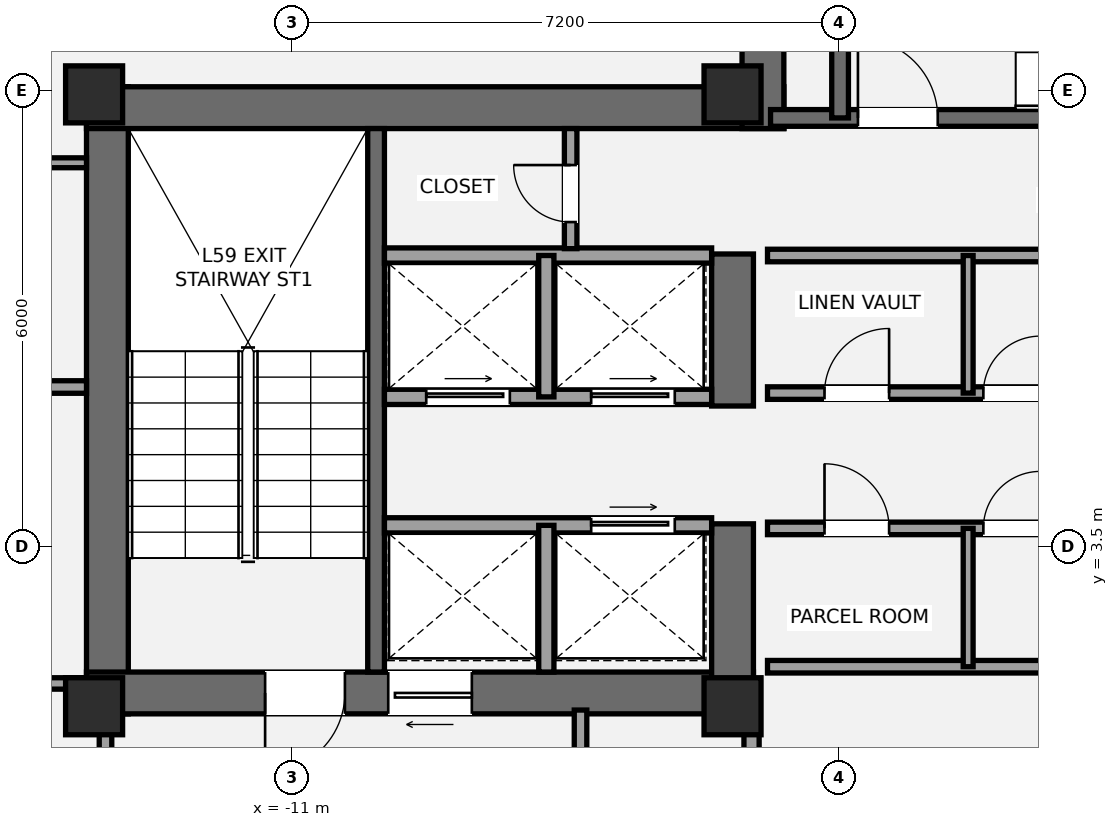
"""IFC4 building model, lengths in metres.
Left out: names, types, materials, properties, quantities, classifications, styles, units other than length and angle.
Written with IfcOpenShell. Run it as: python <this file> out.ifc"""

import sys

from ifc_helpers import new_model, si_unit, direction, frame, frame_2d, origin, origin_2d, place, context, subcontext, project, spatial, rectangle, extrude, element, fill, save


model = new_model("IFC4")
c1 = context("Model", 3, precision=1e-05, world=origin(), true_north=direction((0.0, 1.0)))
c2 = subcontext(c1, "Body", "Model", "MODEL_VIEW")
j1 = project(units=[si_unit("LENGTHUNIT", "METRE"), si_unit("PLANEANGLEUNIT", "RADIAN")], contexts=[c1])
p1 = place(None, origin())
s1 = spatial("IfcSite", under=j1, at=p1, CompositionType="ELEMENT")
p2 = place(p1, origin())
s2 = spatial("IfcBuilding", under=s1, at=p2, CompositionType="ELEMENT")
p3 = place(p2, frame((0.0, 0.0, 213.15)))
s3 = spatial("IfcBuildingStorey", under=s2, at=p3, CompositionType="ELEMENT", Elevation=213.15)
p4 = place(p3, frame((-13.425, 1.3, 0.0), z_axis=(0.0, 0.0, 1.0), x_axis=(0.0, 1.0, 0.0)))
e1 = element("IfcWall", 1, at=p4, inside=s3, PredefinedType="SHEAR", context=c2, shape_type="SweptSolid", body=[
    extrude(rectangle(XDim=8.25, YDim=0.55, at=frame_2d((4.125, 0.0))), origin(), (0.0, 0.0, 1.0), 3.15),
])
p5 = place(p3, frame((-13.7, 9.275, 0.0), z_axis=(0.0, 0.0, 1.0), x_axis=(1.0, 0.0, 0.0)))
e2 = element("IfcWall", 2, at=p5, inside=s3, PredefinedType="SHEAR", context=c2, shape_type="SweptSolid", body=[
    extrude(rectangle(XDim=9.175, YDim=0.55, at=frame_2d((4.587, 0.0))), origin(), (0.0, 0.0, 1.0), 3.15),
])
p6 = place(p3, frame((-4.925, 1.575, 0.0), z_axis=(0.0, 0.0, 1.0), x_axis=(-1.0, 0.0, 0.0)))
e3 = element("IfcWall", 3, at=p6, inside=s3, PredefinedType="SHEAR", context=c2, shape_type="SweptSolid", body=[
    extrude(rectangle(XDim=8.775, YDim=0.55, at=frame_2d((4.387, 0.0))), origin(), (0.0, 0.0, 1.0), 3.15),
])
p7 = place(p6, frame((5.375, 0.0, 0.0)))
e4 = element("IfcOpeningElement", 4, at=p7, cuts=e3, PredefinedType="OPENING", context=c2, shape_type="SweptSolid", body=[
    extrude(rectangle(XDim=1.05, YDim=2.15, at=frame_2d((0.525, 1.075))), frame((0.0, 0.285, 0.0), z_axis=(0.0, -1.0, 0.0), x_axis=(1.0, 0.0, 0.0)), (0.0, 0.0, 1.0), 0.57),
])
p8 = place(p6, frame((3.705, 0.0, 0.0)))
e5 = element("IfcOpeningElement", 5, at=p8, cuts=e3, PredefinedType="OPENING", context=c2, shape_type="SweptSolid", body=[
    extrude(rectangle(XDim=1.1, YDim=2.2, at=frame_2d((0.55, 1.1))), frame((0.0, 0.285, 0.0), z_axis=(0.0, -1.0, 0.0), x_axis=(1.0, 0.0, 0.0)), (0.0, 0.0, 1.0), 0.57),
])
p9 = place(p3, frame((-5.2, 1.3, 0.0), z_axis=(0.0, 0.0, 1.0), x_axis=(0.0, 1.0, 0.0)))
e6 = element("IfcWall", 6, at=p9, inside=s3, PredefinedType="SHEAR", context=c2, shape_type="SweptSolid", body=[
    extrude(rectangle(XDim=2.5, YDim=0.55, at=frame_2d((1.25, 0.0))), origin(), (0.0, 0.0, 1.0), 3.15),
])
p10 = place(p3, frame((-5.2, 5.35, 0.0), z_axis=(0.0, 0.0, 1.0), x_axis=(0.0, 1.0, 0.0)))
e7 = element("IfcWall", 7, at=p10, inside=s3, PredefinedType="SHEAR", context=c2, shape_type="SweptSolid", body=[
    extrude(rectangle(XDim=2.0, YDim=0.55, at=frame_2d((1.0, 0.0))), origin(), (0.0, 0.0, 1.0), 3.15),
])
p11 = place(p3, frame((-9.89, 1.85, 0.0), z_axis=(0.0, 0.0, 1.0), x_axis=(0.0, 1.0, 0.0)))
e8 = element("IfcWall", 8, at=p11, inside=s3, PredefinedType="SHEAR", context=c2, shape_type="SweptSolid", body=[
    extrude(rectangle(XDim=7.15, YDim=0.22, at=frame_2d((3.575, 0.0))), origin(), (0.0, 0.0, 1.0), 3.15),
])
p12 = place(p3, frame((-4.8, 9.0, 0.0), z_axis=(0.0, 0.0, 1.0), x_axis=(0.0, 1.0, 0.0)))
e9 = element("IfcWall", 9, at=p12, inside=s3, PredefinedType="SHEAR", context=c2, shape_type="SweptSolid", body=[
    extrude(rectangle(XDim=3.95, YDim=0.55, at=frame_2d((1.975, 0.0))), origin(), (0.0, 0.0, 1.0), 3.15),
])
p13 = place(p3, frame((-4.7, 9.14, 0.0), z_axis=(0.0, 0.0, 1.0), x_axis=(1.0, 0.0, 0.0)))
e10 = element("IfcWall", 10, at=p13, inside=s3, PredefinedType="SHEAR", context=c2, shape_type="SweptSolid", body=[
    extrude(rectangle(XDim=9.3, YDim=0.22, at=frame_2d((4.65, 0.0))), origin(), (0.0, 0.0, 1.0), 3.15),
])
p14 = place(p13, frame((1.15, 0.0, 0.0)))
e11 = element("IfcOpeningElement", 11, at=p14, cuts=e10, PredefinedType="OPENING", context=c2, shape_type="SweptSolid", body=[
    extrude(rectangle(XDim=1.05, YDim=2.15, at=frame_2d((0.525, 1.075))), frame((0.0, 0.12, 0.0), z_axis=(0.0, -1.0, 0.0), x_axis=(1.0, 0.0, 0.0)), (0.0, 0.0, 1.0), 0.24),
])
p15 = place(p3, frame((-3.785, 9.14, 0.0), z_axis=(0.0, 0.0, 1.0), x_axis=(0.0, 1.0, 0.0)))
e12 = element("IfcWall", 12, at=p15, inside=s3, PredefinedType="SHEAR", context=c2, shape_type="SweptSolid", body=[
    extrude(rectangle(XDim=3.26, YDim=0.22, at=frame_2d((1.63, 0.0))), origin(), (0.0, 0.0, 1.0), 3.15),
])
for number, where, z_axis, x_axis in (
    (13, (-13.6, 1.4, 0.0), (0.0, 0.0, 1.0), (1.0, 0.0, 0.0)),
    (14, (-13.6, 9.45, 0.0), (0.0, 0.0, 1.0), (1.0, 0.0, 0.0)),
    (15, (-5.2, 1.4, 0.0), (0.0, 0.0, 1.0), (1.0, 0.0, 0.0)),
    (16, (-5.2, 9.45, 0.0), (0.0, 0.0, 1.0), (1.0, 0.0, 0.0)),
):
    element("IfcColumn", number, at=place(p3, frame(where, z_axis=z_axis, x_axis=x_axis)), inside=s3, PredefinedType="PILASTER", context=c2, shape_type="SweptSolid", body=[
        extrude(rectangle(XDim=0.75, YDim=0.75, at=origin_2d()), origin(), (0.0, 0.0, 1.0), 3.15),
    ])
p16 = place(p3, frame((-16.973, 9.334, 0.0), z_axis=(0.0, 0.0, 1.0), x_axis=(0.827592777121, 0.561328954586, 0.0)))
e17 = element("IfcWall", 17, at=p16, inside=s3, PredefinedType="STANDARD", context=c2, shape_type="SweptSolid", body=[
    extrude(rectangle(XDim=3.704, YDim=0.44, at=frame_2d((1.852, 0.0))), origin(), (0.0, 0.0, 1.0), 2.336),
])
p17 = place(p16, frame((2.555, 0.0, 0.58)))
e18 = element("IfcOpeningElement", 18, at=p17, cuts=e17, PredefinedType="OPENING", context=c2, shape_type="SweptSolid", body=[
    extrude(rectangle(XDim=0.9, YDim=1.35, at=frame_2d((0.45, 0.675))), frame((0.0, 0.23, 0.0), z_axis=(0.0, -1.0, 0.0), x_axis=(1.0, 0.0, 0.0)), (0.0, 0.0, 1.0), 0.46),
])
p18 = place(p3, frame((-13.45, -2.15, 0.0), z_axis=(0.0, 0.0, 1.0), x_axis=(0.0, 1.0, 0.0)))
e19 = element("IfcWall", 19, at=p18, inside=s3, PredefinedType="PARTITIONING", context=c2, shape_type="SweptSolid", body=[
    extrude(rectangle(XDim=3.5, YDim=0.165, at=frame_2d((1.75, 0.0))), origin(), (0.0, 0.0, 1.0), 2.423),
])
p19 = place(p18, frame((0.67, 0.0, 0.0)))
e20 = element("IfcOpeningElement", 20, at=p19, cuts=e19, PredefinedType="OPENING", context=c2, shape_type="SweptSolid", body=[
    extrude(rectangle(XDim=1.05, YDim=2.15, at=frame_2d((0.525, 1.075))), frame((0.0, 0.093, 0.0), z_axis=(0.0, -1.0, 0.0), x_axis=(1.0, 0.0, 0.0)), (0.0, 0.0, 1.0), 0.185),
])
p20 = place(p3, frame((-7.2, -2.15, 0.0), z_axis=(0.0, 0.0, 1.0), x_axis=(0.0, 1.0, 0.0)))
e21 = element("IfcWall", 21, at=p20, inside=s3, PredefinedType="PARTITIONING", context=c2, shape_type="SweptSolid", body=[
    extrude(rectangle(XDim=3.5, YDim=0.165, at=frame_2d((1.75, 0.0))), origin(), (0.0, 0.0, 1.0), 2.423),
])
p21 = place(p3, frame((-4.95, -2.15, 0.0), z_axis=(0.0, 0.0, 1.0), x_axis=(0.0, 1.0, 0.0)))
e22 = element("IfcWall", 22, at=p21, inside=s3, PredefinedType="SOLIDWALL", context=c2, shape_type="SweptSolid", body=[
    extrude(rectangle(XDim=3.5, YDim=0.2, at=frame_2d((1.75, 0.0))), origin(), (0.0, 0.0, 1.0), 2.423),
])
p22 = place(p21, frame((0.95, 0.0, 0.0)))
e23 = element("IfcOpeningElement", 23, at=p22, cuts=e22, PredefinedType="OPENING", context=c2, shape_type="SweptSolid", body=[
    extrude(rectangle(XDim=0.75, YDim=2.1, at=frame_2d((0.375, 1.05))), frame((0.0, 0.11, 0.0), z_axis=(0.0, -1.0, 0.0), x_axis=(1.0, 0.0, 0.0)), (0.0, 0.0, 1.0), 0.22),
])
p23 = place(p3, frame((-9.78, 3.78, 0.0), z_axis=(0.0, 0.0, 1.0), x_axis=(1.0, 0.0, 0.0)))
e24 = element("IfcWall", 24, at=p23, inside=s3, PredefinedType="SOLIDWALL", context=c2, shape_type="SweptSolid", body=[
    extrude(rectangle(XDim=4.305, YDim=0.2, at=frame_2d((2.152, 0.0))), origin(), (0.0, 0.0, 1.0), 2.97),
])
p24 = place(p23, frame((2.72, 0.0, 0.0)))
e25 = element("IfcOpeningElement", 25, at=p24, cuts=e24, PredefinedType="OPENING", context=c2, shape_type="SweptSolid", body=[
    extrude(rectangle(XDim=1.1, YDim=2.2, at=frame_2d((0.55, 1.1))), frame((0.0, 0.11, 0.0), z_axis=(0.0, -1.0, 0.0), x_axis=(1.0, 0.0, 0.0)), (0.0, 0.0, 1.0), 0.22),
])
p25 = place(p3, frame((-7.65, 1.85, 0.0), z_axis=(0.0, 0.0, 1.0), x_axis=(0.0, 1.0, 0.0)))
e26 = element("IfcWall", 26, at=p25, inside=s3, PredefinedType="SOLIDWALL", context=c2, shape_type="SweptSolid", body=[
    extrude(rectangle(XDim=1.93, YDim=0.2, at=frame_2d((0.965, 0.0))), origin(), (0.0, 0.0, 1.0), 2.97),
])
p26 = place(p3, frame((-9.78, 5.47, 0.0), z_axis=(0.0, 0.0, 1.0), x_axis=(1.0, 0.0, 0.0)))
e27 = element("IfcWall", 27, at=p26, inside=s3, PredefinedType="SOLIDWALL", context=c2, shape_type="SweptSolid", body=[
    extrude(rectangle(XDim=4.305, YDim=0.2, at=frame_2d((2.152, 0.0))), origin(), (0.0, 0.0, 1.0), 2.97),
])
p27 = place(p26, frame((0.55, 0.0, 0.0)))
e28 = element("IfcOpeningElement", 28, at=p27, cuts=e27, PredefinedType="OPENING", context=c2, shape_type="SweptSolid", body=[
    extrude(rectangle(XDim=1.1, YDim=2.2, at=frame_2d((0.55, 1.1))), frame((0.0, 0.11, 0.0), z_axis=(0.0, -1.0, 0.0), x_axis=(1.0, 0.0, 0.0)), (0.0, 0.0, 1.0), 0.22),
])
p28 = place(p26, frame((2.72, 0.0, 0.0)))
e29 = element("IfcOpeningElement", 29, at=p28, cuts=e27, PredefinedType="OPENING", context=c2, shape_type="SweptSolid", body=[
    extrude(rectangle(XDim=1.1, YDim=2.2, at=frame_2d((0.55, 1.1))), frame((0.0, 0.11, 0.0), z_axis=(0.0, -1.0, 0.0), x_axis=(1.0, 0.0, 0.0)), (0.0, 0.0, 1.0), 0.22),
])
p29 = place(p3, frame((-9.78, 7.33, 0.0), z_axis=(0.0, 0.0, 1.0), x_axis=(1.0, 0.0, 0.0)))
e30 = element("IfcWall", 30, at=p29, inside=s3, PredefinedType="SOLIDWALL", context=c2, shape_type="SweptSolid", body=[
    extrude(rectangle(XDim=4.305, YDim=0.2, at=frame_2d((2.152, 0.0))), origin(), (0.0, 0.0, 1.0), 2.97),
])
p30 = place(p3, frame((-7.65, 5.47, 0.0), z_axis=(0.0, 0.0, 1.0), x_axis=(0.0, 1.0, 0.0)))
e31 = element("IfcWall", 31, at=p30, inside=s3, PredefinedType="SOLIDWALL", context=c2, shape_type="SweptSolid", body=[
    extrude(rectangle(XDim=1.86, YDim=0.2, at=frame_2d((0.93, 0.0))), origin(), (0.0, 0.0, 1.0), 2.97),
])
p31 = place(p3, frame((-4.74, 1.92, 0.0), z_axis=(0.0, 0.0, 1.0), x_axis=(1.0, 0.0, 0.0)))
e32 = element("IfcWall", 32, at=p31, inside=s3, PredefinedType="PARTITIONING", context=c2, shape_type="SweptSolid", body=[
    extrude(rectangle(XDim=3.89, YDim=0.165, at=frame_2d((1.945, 0.0))), origin(), (0.0, 0.0, 1.0), 2.11),
])
p32 = place(p3, frame((-4.74, 3.74, 0.0), z_axis=(0.0, 0.0, 1.0), x_axis=(1.0, 0.0, 0.0)))
e33 = element("IfcWall", 33, at=p32, inside=s3, PredefinedType="PARTITIONING", context=c2, shape_type="SweptSolid", body=[
    extrude(rectangle(XDim=3.89, YDim=0.165, at=frame_2d((1.945, 0.0))), origin(), (0.0, 0.0, 1.0), 2.97),
])
p33 = place(p32, frame((0.75, 0.0, 0.0)))
e34 = element("IfcOpeningElement", 34, at=p33, cuts=e33, PredefinedType="OPENING", context=c2, shape_type="SweptSolid", body=[
    extrude(rectangle(XDim=0.85, YDim=2.1, at=frame_2d((0.425, 1.05))), frame((0.0, 0.093, 0.0), z_axis=(0.0, -1.0, 0.0), x_axis=(1.0, 0.0, 0.0)), (0.0, 0.0, 1.0), 0.185),
])
p34 = place(p32, frame((2.84, 0.0, 0.0)))
e35 = element("IfcOpeningElement", 35, at=p34, cuts=e33, PredefinedType="OPENING", context=c2, shape_type="SweptSolid", body=[
    extrude(rectangle(XDim=0.75, YDim=2.1, at=frame_2d((0.375, 1.05))), frame((0.0, 0.093, 0.0), z_axis=(0.0, -1.0, 0.0), x_axis=(1.0, 0.0, 0.0)), (0.0, 0.0, 1.0), 0.185),
])
p35 = place(p3, frame((-2.1, 1.92, 0.0), z_axis=(0.0, 0.0, 1.0), x_axis=(0.0, 1.0, 0.0)))
e36 = element("IfcWall", 36, at=p35, inside=s3, PredefinedType="PARTITIONING", context=c2, shape_type="SweptSolid", body=[
    extrude(rectangle(XDim=1.82, YDim=0.13, at=frame_2d((0.91, 0.0))), origin(), (0.0, 0.0, 1.0), 2.97),
])
p36 = place(p3, frame((-4.74, 5.52, 0.0), z_axis=(0.0, 0.0, 1.0), x_axis=(1.0, 0.0, 0.0)))
e37 = element("IfcWall", 37, at=p36, inside=s3, PredefinedType="PARTITIONING", context=c2, shape_type="SweptSolid", body=[
    extrude(rectangle(XDim=3.89, YDim=0.165, at=frame_2d((1.945, 0.0))), origin(), (0.0, 0.0, 1.0), 2.97),
])
p37 = place(p36, frame((0.75, 0.0, 0.0)))
e38 = element("IfcOpeningElement", 38, at=p37, cuts=e37, PredefinedType="OPENING", context=c2, shape_type="SweptSolid", body=[
    extrude(rectangle(XDim=0.85, YDim=2.1, at=frame_2d((0.425, 1.05))), frame((0.0, 0.093, 0.0), z_axis=(0.0, -1.0, 0.0), x_axis=(1.0, 0.0, 0.0)), (0.0, 0.0, 1.0), 0.185),
])
p38 = place(p36, frame((2.84, 0.0, 0.0)))
e39 = element("IfcOpeningElement", 39, at=p38, cuts=e37, PredefinedType="OPENING", context=c2, shape_type="SweptSolid", body=[
    extrude(rectangle(XDim=0.75, YDim=2.1, at=frame_2d((0.375, 1.05))), frame((0.0, 0.093, 0.0), z_axis=(0.0, -1.0, 0.0), x_axis=(1.0, 0.0, 0.0)), (0.0, 0.0, 1.0), 0.185),
])
p39 = place(p3, frame((-4.74, 7.33, 0.0), z_axis=(0.0, 0.0, 1.0), x_axis=(1.0, 0.0, 0.0)))
e40 = element("IfcWall", 40, at=p39, inside=s3, PredefinedType="PARTITIONING", context=c2, shape_type="SweptSolid", body=[
    extrude(rectangle(XDim=3.89, YDim=0.165, at=frame_2d((1.945, 0.0))), origin(), (0.0, 0.0, 1.0), 2.97),
])
p40 = place(p3, frame((-2.1, 5.52, 0.0), z_axis=(0.0, 0.0, 1.0), x_axis=(0.0, 1.0, 0.0)))
e41 = element("IfcWall", 41, at=p40, inside=s3, PredefinedType="PARTITIONING", context=c2, shape_type="SweptSolid", body=[
    extrude(rectangle(XDim=1.81, YDim=0.13, at=frame_2d((0.905, 0.0))), origin(), (0.0, 0.0, 1.0), 2.97),
])
p41 = place(p3, frame((-7.33, 7.42, 0.0), z_axis=(0.0, 0.0, 1.0), x_axis=(0.0, 1.0, 0.0)))
e42 = element("IfcWall", 42, at=p41, inside=s3, PredefinedType="PARTITIONING", context=c2, shape_type="SweptSolid", body=[
    extrude(rectangle(XDim=1.58, YDim=0.165, at=frame_2d((0.79, 0.0))), origin(), (0.0, 0.0, 1.0), 2.97),
])
p42 = place(p41, frame((0.35, 0.0, 0.0)))
e43 = element("IfcOpeningElement", 43, at=p42, cuts=e42, PredefinedType="OPENING", context=c2, shape_type="SweptSolid", body=[
    extrude(rectangle(XDim=0.75, YDim=2.1, at=frame_2d((0.375, 1.05))), frame((0.0, 0.093, 0.0), z_axis=(0.0, -1.0, 0.0), x_axis=(1.0, 0.0, 0.0)), (0.0, 0.0, 1.0), 0.185),
])
p43 = place(p3, frame((-20.753, 5.6, 0.0), z_axis=(0.0, 0.0, 1.0), x_axis=(1.0, 0.0, 0.0)))
e44 = element("IfcWall", 44, at=p43, inside=s3, PredefinedType="PARTITIONING", context=c2, shape_type="SweptSolid", body=[
    extrude(rectangle(XDim=7.053, YDim=0.165, at=frame_2d((3.527, 0.0))), origin(), (0.0, 0.0, 1.0), 2.423),
])
p44 = place(p43, frame((2.584, 0.0, 0.0)))
e45 = element("IfcOpeningElement", 45, at=p44, cuts=e44, PredefinedType="OPENING", context=c2, shape_type="SweptSolid", body=[
    extrude(rectangle(XDim=0.85, YDim=2.1, at=frame_2d((0.425, 1.05))), frame((0.0, 0.093, 0.0), z_axis=(0.0, -1.0, 0.0), x_axis=(1.0, 0.0, 0.0)), (0.0, 0.0, 1.0), 0.185),
])
p45 = place(p3, frame((-17.95, 1.7, 0.0), z_axis=(0.0, 0.0, 1.0), x_axis=(1.0, 0.0, 0.0)))
e46 = element("IfcWall", 46, at=p45, inside=s3, PredefinedType="PLUMBINGWALL", context=c2, shape_type="SweptSolid", body=[
    extrude(rectangle(XDim=4.25, YDim=0.15, at=frame_2d((2.125, 0.0))), origin(), (0.0, 0.0, 1.0), 2.423),
])
p46 = place(p45, frame((2.85, 0.0, 0.0)))
e47 = element("IfcOpeningElement", 47, at=p46, cuts=e46, PredefinedType="OPENING", context=c2, shape_type="SweptSolid", body=[
    extrude(rectangle(XDim=0.8, YDim=2.1, at=frame_2d((0.4, 1.05))), frame((0.0, 0.085, 0.0), z_axis=(0.0, -1.0, 0.0), x_axis=(1.0, 0.0, 0.0)), (0.0, 0.0, 1.0), 0.17),
])
p47 = place(p45, frame((1.27, 0.0, 0.0)))
e48 = element("IfcOpeningElement", 48, at=p47, cuts=e46, PredefinedType="OPENING", context=c2, shape_type="SweptSolid", body=[
    extrude(rectangle(XDim=0.85, YDim=2.1, at=frame_2d((0.425, 1.05))), frame((0.0, 0.085, 0.0), z_axis=(0.0, -1.0, 0.0), x_axis=(1.0, 0.0, 0.0)), (0.0, 0.0, 1.0), 0.17),
])
p48 = place(p3, frame((-17.582, 8.55, 0.0), z_axis=(0.0, 0.0, 1.0), x_axis=(1.0, 0.0, 0.0)))
e49 = element("IfcWall", 49, at=p48, inside=s3, PredefinedType="PARTITIONING", context=c2, shape_type="SweptSolid", body=[
    extrude(rectangle(XDim=3.882, YDim=0.13, at=frame_2d((1.941, 0.0))), origin(), (0.0, 0.0, 1.0), 2.423),
])
p49 = place(p48, frame((1.381, 0.0, 0.0)))
e50 = element("IfcOpeningElement", 50, at=p49, cuts=e49, PredefinedType="OPENING", context=c2, shape_type="SweptSolid", body=[
    extrude(rectangle(XDim=0.85, YDim=2.1, at=frame_2d((0.425, 1.05))), frame((0.0, 0.075, 0.0), z_axis=(0.0, -1.0, 0.0), x_axis=(1.0, 0.0, 0.0)), (0.0, 0.0, 1.0), 0.15),
])
p50 = place(p7, origin())
e51 = element("IfcDoor", 51, at=p50, inside=s3, OperationType="SINGLE_SWING_RIGHT", PredefinedType="DOOR", context=c2, shape_type="SweptSolid", body=[
    extrude(rectangle(XDim=1.05, YDim=2.15, at=frame_2d((0.525, 1.075))), frame((0.0, 0.025, 0.0), z_axis=(0.0, -1.0, 0.0), x_axis=(1.0, 0.0, 0.0)), (0.0, 0.0, 1.0), 0.05),
])
fill(e4, e51)
p51 = place(p14, origin())
e52 = element("IfcDoor", 52, at=p51, inside=s3, OperationType="SINGLE_SWING_LEFT", PredefinedType="DOOR", context=c2, shape_type="SweptSolid", body=[
    extrude(rectangle(XDim=1.05, YDim=2.15, at=frame_2d((0.525, 1.075))), frame((0.0, 0.025, 0.0), z_axis=(0.0, -1.0, 0.0), x_axis=(1.0, 0.0, 0.0)), (0.0, 0.0, 1.0), 0.05),
])
fill(e11, e52)
p52 = place(p8, origin())
e53 = element("IfcDoor", 53, at=p52, inside=s3, OperationType="SLIDING_TO_LEFT", PredefinedType="DOOR", context=c2, shape_type="SweptSolid", body=[
    extrude(rectangle(XDim=1.1, YDim=2.2, at=frame_2d((0.55, 1.1))), frame((0.0, 0.025, 0.0), z_axis=(0.0, -1.0, 0.0), x_axis=(1.0, 0.0, 0.0)), (0.0, 0.0, 1.0), 0.05),
])
fill(e5, e53)
p53 = place(p27, origin())
e54 = element("IfcDoor", 54, at=p53, inside=s3, OperationType="SLIDING_TO_LEFT", PredefinedType="DOOR", context=c2, shape_type="SweptSolid", body=[
    extrude(rectangle(XDim=1.1, YDim=2.2, at=frame_2d((0.55, 1.1))), frame((0.0, 0.025, 0.0), z_axis=(0.0, -1.0, 0.0), x_axis=(1.0, 0.0, 0.0)), (0.0, 0.0, 1.0), 0.05),
])
fill(e28, e54)
p54 = place(p28, origin())
e55 = element("IfcDoor", 55, at=p54, inside=s3, OperationType="SLIDING_TO_LEFT", PredefinedType="DOOR", context=c2, shape_type="SweptSolid", body=[
    extrude(rectangle(XDim=1.1, YDim=2.2, at=frame_2d((0.55, 1.1))), frame((0.0, 0.025, 0.0), z_axis=(0.0, -1.0, 0.0), x_axis=(1.0, 0.0, 0.0)), (0.0, 0.0, 1.0), 0.05),
])
fill(e29, e55)
p55 = place(p24, origin())
e56 = element("IfcDoor", 56, at=p55, inside=s3, OperationType="SLIDING_TO_LEFT", PredefinedType="DOOR", context=c2, shape_type="SweptSolid", body=[
    extrude(rectangle(XDim=1.1, YDim=2.2, at=frame_2d((0.55, 1.1))), frame((0.0, 0.025, 0.0), z_axis=(0.0, -1.0, 0.0), x_axis=(1.0, 0.0, 0.0)), (0.0, 0.0, 1.0), 0.05),
])
fill(e25, e56)
p56 = place(p33, origin())
e57 = element("IfcDoor", 57, at=p56, inside=s3, OperationType="SINGLE_SWING_LEFT", PredefinedType="DOOR", context=c2, shape_type="SweptSolid", body=[
    extrude(rectangle(XDim=0.85, YDim=2.1, at=frame_2d((0.425, 1.05))), frame((0.0, 0.025, 0.0), z_axis=(0.0, -1.0, 0.0), x_axis=(1.0, 0.0, 0.0)), (0.0, 0.0, 1.0), 0.05),
])
fill(e34, e57)
p57 = place(p34, origin())
e58 = element("IfcDoor", 58, at=p57, inside=s3, OperationType="SINGLE_SWING_RIGHT", PredefinedType="DOOR", context=c2, shape_type="SweptSolid", body=[
    extrude(rectangle(XDim=0.75, YDim=2.1, at=frame_2d((0.375, 1.05))), frame((0.0, 0.025, 0.0), z_axis=(0.0, -1.0, 0.0), x_axis=(1.0, 0.0, 0.0)), (0.0, 0.0, 1.0), 0.05),
])
fill(e35, e58)
p58 = place(p37, origin())
e59 = element("IfcDoor", 59, at=p58, inside=s3, OperationType="SINGLE_SWING_RIGHT", PredefinedType="DOOR", context=c2, shape_type="SweptSolid", body=[
    extrude(rectangle(XDim=0.85, YDim=2.1, at=frame_2d((0.425, 1.05))), frame((0.0, 0.025, 0.0), z_axis=(0.0, -1.0, 0.0), x_axis=(1.0, 0.0, 0.0)), (0.0, 0.0, 1.0), 0.05),
])
fill(e38, e59)
p59 = place(p38, origin())
e60 = element("IfcDoor", 60, at=p59, inside=s3, OperationType="SINGLE_SWING_RIGHT", PredefinedType="DOOR", context=c2, shape_type="SweptSolid", body=[
    extrude(rectangle(XDim=0.75, YDim=2.1, at=frame_2d((0.375, 1.05))), frame((0.0, 0.025, 0.0), z_axis=(0.0, -1.0, 0.0), x_axis=(1.0, 0.0, 0.0)), (0.0, 0.0, 1.0), 0.05),
])
fill(e39, e60)
p60 = place(p42, origin())
e61 = element("IfcDoor", 61, at=p60, inside=s3, OperationType="SINGLE_SWING_RIGHT", PredefinedType="DOOR", context=c2, shape_type="SweptSolid", body=[
    extrude(rectangle(XDim=0.75, YDim=2.1, at=frame_2d((0.375, 1.05))), frame((0.0, 0.025, 0.0), z_axis=(0.0, -1.0, 0.0), x_axis=(1.0, 0.0, 0.0)), (0.0, 0.0, 1.0), 0.05),
])
fill(e43, e61)
save(model, sys.argv[1])
